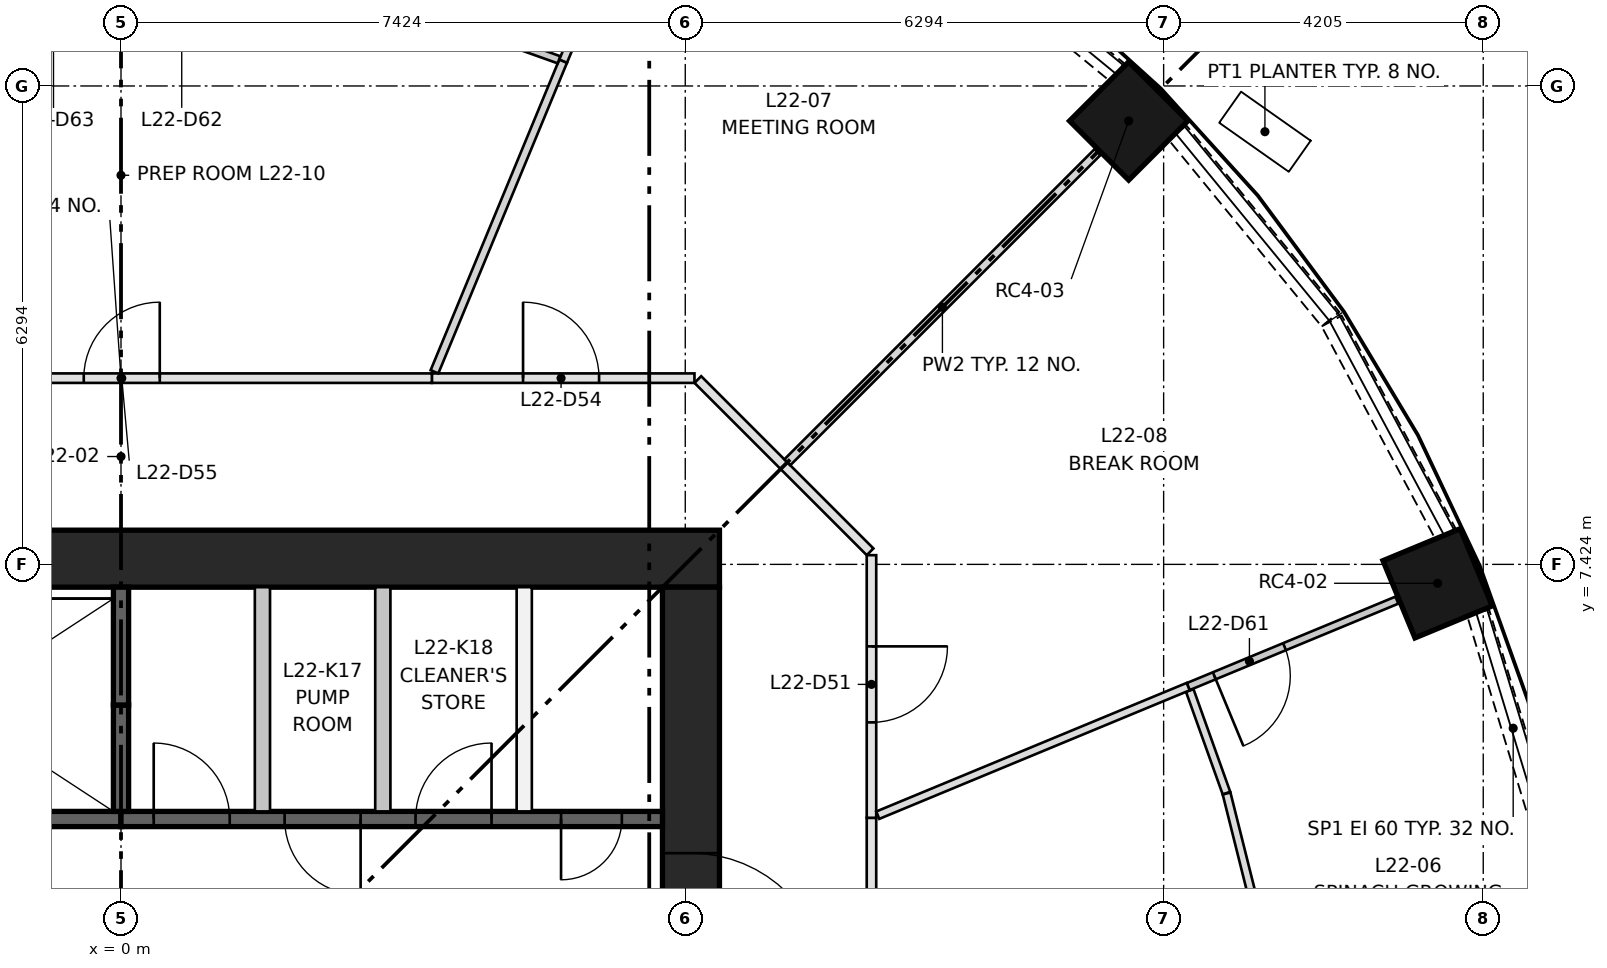
"""IFC4 building model, lengths in metres.
Left out: names, types, materials, properties, quantities, classifications, styles, units other than length and angle.
Written with IfcOpenShell. Run it as: python <this file> out.ifc"""

import sys

from ifc_helpers import new_model, si_unit, direction, frame, frame_2d, origin, origin_2d, place, context, subcontext, project, spatial, rectangle, extrude, element, fill, save


model = new_model("IFC4")
c1 = context("Model", 3, precision=1e-05, world=origin(), true_north=direction((0.0, 1.0)))
c2 = subcontext(c1, "Body", "Model", "MODEL_VIEW")
j1 = project(units=[si_unit("LENGTHUNIT", "METRE"), si_unit("PLANEANGLEUNIT", "RADIAN")], contexts=[c1])
p1 = place(None, origin())
s1 = spatial("IfcSite", under=j1, at=p1, CompositionType="ELEMENT")
p2 = place(p1, origin())
s2 = spatial("IfcBuilding", under=s1, at=p2, CompositionType="ELEMENT")
p3 = place(p2, frame((0.0, 0.0, 87.35)))
s3 = spatial("IfcBuildingStorey", under=s2, at=p3, CompositionType="ELEMENT", Elevation=87.35)
for number, where, z_axis, x_axis in (
    (1, (17.323, 7.175, 0.0), (0.0, 0.0, 1.0), (0.924, 0.383, 0.0)),
    (2, (13.258, 13.258, 0.0), (0.0, 0.0, 1.0), (0.707, 0.707, 0.0)),
):
    element("IfcColumn", number, at=place(p3, frame(where, z_axis=z_axis, x_axis=x_axis)), inside=s3, PredefinedType="COLUMN", context=c2, shape_type="SweptSolid", body=[
        extrude(rectangle(XDim=1.1, YDim=1.1, at=origin_2d()), origin(), (0.0, 0.0, 1.0), 3.65),
    ])
p4 = place(p3, frame((-7.874, 7.499, 0.0), z_axis=(0.0, 0.0, 1.0), x_axis=(1.0, 0.0, 0.0)))
e3 = element("IfcWall", 3, at=p4, inside=s3, PredefinedType="SHEAR", context=c2, shape_type="SweptSolid", body=[
    extrude(rectangle(XDim=15.748, YDim=0.75, at=frame_2d((7.874, 0.0))), origin(), (0.0, 0.0, 1.0), 3.65),
])
p5 = place(p3, frame((7.499, -7.124, 0.0), z_axis=(0.0, 0.0, 1.0), x_axis=(0.0, 1.0, 0.0)))
e4 = element("IfcWall", 4, at=p5, inside=s3, PredefinedType="SHEAR", context=c2, shape_type="SweptSolid", body=[
    extrude(rectangle(XDim=14.248, YDim=0.75, at=frame_2d((7.124, 0.0))), origin(), (0.0, 0.0, 1.0), 3.65),
])
p6 = place(p5, frame((6.624, 0.0, 0.0)))
e5 = element("IfcOpeningElement", 5, at=p6, cuts=e4, PredefinedType="OPENING", context=c2, shape_type="SweptSolid", body=[
    extrude(rectangle(XDim=1.0, YDim=2.1, at=frame_2d((0.5, 1.05))), frame((0.0, 0.385, 0.0), z_axis=(0.0, -1.0, 0.0), x_axis=(1.0, 0.0, 0.0)), (0.0, 0.0, 1.0), 0.77),
])
p7 = place(p5, frame((3.5, 0.0, 0.0)))
e6 = element("IfcOpeningElement", 6, at=p7, cuts=e4, PredefinedType="OPENING", context=c2, shape_type="SweptSolid", body=[
    extrude(rectangle(XDim=1.8, YDim=2.1, at=frame_2d((0.9, 1.05))), frame((0.0, 0.385, 0.0), z_axis=(0.0, -1.0, 0.0), x_axis=(1.0, 0.0, 0.0)), (0.0, 0.0, 1.0), 0.77),
])
p8 = place(p5, frame((8.948, 0.0, 0.0)))
e7 = element("IfcOpeningElement", 7, at=p8, cuts=e4, PredefinedType="OPENING", context=c2, shape_type="SweptSolid", body=[
    extrude(rectangle(XDim=1.8, YDim=2.1, at=frame_2d((0.9, 1.05))), frame((0.0, 0.385, 0.0), z_axis=(0.0, -1.0, 0.0), x_axis=(1.0, 0.0, 0.0)), (0.0, 0.0, 1.0), 0.77),
])
p9 = place(p3, frame((-7.124, 4.074, 0.0), z_axis=(0.0, 0.0, 1.0), x_axis=(1.0, 0.0, 0.0)))
e8 = element("IfcWall", 8, at=p9, inside=s3, PredefinedType="SHEAR", context=c2, shape_type="SweptSolid", body=[
    extrude(rectangle(XDim=7.124, YDim=0.2, at=frame_2d((3.562, 0.0))), origin(), (0.0, 0.0, 1.0), 3.3),
])
p10 = place(p3, frame((0.0, 4.074, 0.0), z_axis=(0.0, 0.0, 1.0), x_axis=(1.0, 0.0, 0.0)))
e9 = element("IfcWall", 9, at=p10, inside=s3, PredefinedType="SHEAR", context=c2, shape_type="SweptSolid", body=[
    extrude(rectangle(XDim=7.124, YDim=0.2, at=frame_2d((3.562, 0.0))), origin(), (0.0, 0.0, 1.0), 3.3),
])
p11 = place(p10, frame((0.43, 0.0, 0.0)))
e10 = element("IfcOpeningElement", 10, at=p11, cuts=e9, PredefinedType="OPENING", context=c2, shape_type="SweptSolid", body=[
    extrude(rectangle(XDim=1.0, YDim=2.1, at=frame_2d((0.5, 1.05))), frame((0.0, 0.11, 0.0), z_axis=(0.0, -1.0, 0.0), x_axis=(1.0, 0.0, 0.0)), (0.0, 0.0, 1.0), 0.22),
])
p12 = place(p10, frame((2.153, 0.0, 0.0)))
e11 = element("IfcOpeningElement", 11, at=p12, cuts=e9, PredefinedType="OPENING", context=c2, shape_type="SweptSolid", body=[
    extrude(rectangle(XDim=1.0, YDim=2.1, at=frame_2d((0.5, 1.05))), frame((0.0, 0.11, 0.0), z_axis=(0.0, -1.0, 0.0), x_axis=(1.0, 0.0, 0.0)), (0.0, 0.0, 1.0), 0.22),
])
p13 = place(p10, frame((3.875, 0.0, 0.0)))
e12 = element("IfcOpeningElement", 12, at=p13, cuts=e9, PredefinedType="OPENING", context=c2, shape_type="SweptSolid", body=[
    extrude(rectangle(XDim=1.0, YDim=2.1, at=frame_2d((0.5, 1.05))), frame((0.0, 0.11, 0.0), z_axis=(0.0, -1.0, 0.0), x_axis=(1.0, 0.0, 0.0)), (0.0, 0.0, 1.0), 0.22),
])
p14 = place(p10, frame((5.79, 0.0, 0.0)))
e13 = element("IfcOpeningElement", 13, at=p14, cuts=e9, PredefinedType="OPENING", context=c2, shape_type="SweptSolid", body=[
    extrude(rectangle(XDim=0.8, YDim=2.1, at=frame_2d((0.4, 1.05))), frame((0.0, 0.11, 0.0), z_axis=(0.0, -1.0, 0.0), x_axis=(1.0, 0.0, 0.0)), (0.0, 0.0, 1.0), 0.22),
])
p15 = place(p3, frame((0.0, 4.174, 0.0), z_axis=(0.0, 0.0, 1.0), x_axis=(0.0, 1.0, 0.0)))
e14 = element("IfcWall", 14, at=p15, inside=s3, PredefinedType="SHEAR", context=c2, shape_type="SweptSolid", body=[
    extrude(rectangle(XDim=1.4, YDim=0.2, at=frame_2d((0.7, 0.0))), origin(), (0.0, 0.0, 1.0), 3.3),
])
p16 = place(p3, frame((0.0, 5.574, 0.0), z_axis=(0.0, 0.0, 1.0), x_axis=(0.0, 1.0, 0.0)))
e15 = element("IfcWall", 15, at=p16, inside=s3, PredefinedType="SHEAR", context=c2, shape_type="SweptSolid", body=[
    extrude(rectangle(XDim=1.55, YDim=0.2, at=frame_2d((0.775, 0.0))), origin(), (0.0, 0.0, 1.0), 3.3),
])
for number, where, z_axis, x_axis in (
    (16, (1.861, 4.174, 0.0), (0.0, 0.0, 1.0), (0.0, 1.0, 0.0)),
    (17, (3.445, 4.174, 0.0), (0.0, 0.0, 1.0), (0.0, 1.0, 0.0)),
    (18, (5.305, 4.174, 0.0), (0.0, 0.0, 1.0), (0.0, 1.0, 0.0)),
):
    element("IfcWall", number, at=place(p3, frame(where, z_axis=z_axis, x_axis=x_axis)), inside=s3, PredefinedType="PARTITIONING", context=c2, shape_type="SweptSolid", body=[
        extrude(rectangle(XDim=2.95, YDim=0.2, at=frame_2d((1.475, 0.0))), origin(), (0.0, 0.0, 1.0), 3.3),
    ])
p17 = place(p3, frame((18.778, 3.75, 0.0), z_axis=(0.0, 0.0, 1.0), x_axis=(-0.290325591482, 0.956927923582, 0.0)))
e19 = element("IfcWall", 19, at=p17, inside=s3, PredefinedType="SOLIDWALL", context=c2, shape_type="SweptSolid", body=[
    extrude(rectangle(XDim=3.173, YDim=0.3, at=frame_2d((1.586, 0.0))), origin(), (0.0, 0.0, 1.0), 0.9),
])
p18 = place(p3, frame((17.425, 7.828, 0.0), z_axis=(0.0, 0.0, 1.0), x_axis=(-0.471458802606, 0.88188808669, 0.0)))
e20 = element("IfcWall", 20, at=p18, inside=s3, PredefinedType="SOLIDWALL", context=c2, shape_type="SweptSolid", body=[
    extrude(rectangle(XDim=3.172, YDim=0.3, at=frame_2d((1.586, 0.0))), origin(), (0.0, 0.0, 1.0), 0.9),
])
for number, where, z_axis, x_axis in (
    (21, (15.913, 10.651, 0.0), (0.0, 0.0, 1.0), (-0.634, 0.773, 0.0)),
    (22, (13.104, 13.9, 0.0), (0.0, 0.0, 1.0), (-0.773, 0.634, 0.0)),
):
    element("IfcWall", number, at=place(p3, frame(where, z_axis=z_axis, x_axis=x_axis)), inside=s3, PredefinedType="SOLIDWALL", context=c2, shape_type="SweptSolid", body=[
        extrude(rectangle(XDim=3.173, YDim=0.3, at=frame_2d((1.586, 0.0))), origin(), (0.0, 0.0, 1.0), 0.9),
    ])
p19 = place(p3, frame((9.874, 4.09, 0.0), z_axis=(0.0, 0.0, 1.0), x_axis=(0.0, -1.0, 0.0)))
e23 = element("IfcWall", 23, at=p19, inside=s3, PredefinedType="PARTITIONING", context=c2, shape_type="SweptSolid", body=[
    extrude(rectangle(XDim=4.09, YDim=0.125, at=frame_2d((2.045, 0.0))), origin(), (0.0, 0.0, 1.0), 3.3),
])
p20 = place(p19, frame((1.5, 0.0, 0.0)))
e24 = element("IfcOpeningElement", 24, at=p20, cuts=e23, PredefinedType="OPENING", context=c2, shape_type="SweptSolid", body=[
    extrude(rectangle(XDim=1.0, YDim=2.1, at=frame_2d((0.5, 1.05))), frame((0.0, 0.073, 0.0), z_axis=(0.0, -1.0, 0.0), x_axis=(1.0, 0.0, 0.0)), (0.0, 0.0, 1.0), 0.145),
])
p21 = place(p3, frame((8.722, 8.722, 0.0), z_axis=(0.0, 0.0, 1.0), x_axis=(0.70718294931, -0.707030604857, 0.0)))
e25 = element("IfcWall", 25, at=p21, inside=s3, PredefinedType="PARTITIONING", context=c2, shape_type="SweptSolid", body=[
    extrude(rectangle(XDim=1.603, YDim=0.125, at=frame_2d((0.801, 0.0))), origin(), (0.0, 0.0, 1.0), 3.3),
])
p22 = place(p3, frame((9.874, 7.545, 0.0), z_axis=(0.0, 0.0, 1.0), x_axis=(0.0, -1.0, 0.0)))
e26 = element("IfcWall", 26, at=p22, inside=s3, PredefinedType="PARTITIONING", context=c2, shape_type="SweptSolid", body=[
    extrude(rectangle(XDim=3.455, YDim=0.125, at=frame_2d((1.728, 0.0))), origin(), (0.0, 0.0, 1.0), 3.3),
])
p23 = place(p22, frame((1.2, 0.0, 0.0)))
e27 = element("IfcOpeningElement", 27, at=p23, cuts=e26, PredefinedType="OPENING", context=c2, shape_type="SweptSolid", body=[
    extrude(rectangle(XDim=1.0, YDim=2.1, at=frame_2d((0.5, 1.05))), frame((0.0, 0.073, 0.0), z_axis=(0.0, -1.0, 0.0), x_axis=(1.0, 0.0, 0.0)), (0.0, 0.0, 1.0), 0.145),
])
p24 = place(p3, frame((4.09, 9.874, 0.0), z_axis=(0.0, 0.0, 1.0), x_axis=(1.0, 0.0, 0.0)))
e28 = element("IfcWall", 28, at=p24, inside=s3, PredefinedType="PARTITIONING", context=c2, shape_type="SweptSolid", body=[
    extrude(rectangle(XDim=3.455, YDim=0.125, at=frame_2d((1.728, 0.0))), origin(), (0.0, 0.0, 1.0), 3.3),
])
p25 = place(p24, frame((1.2, 0.0, 0.0)))
e29 = element("IfcOpeningElement", 29, at=p25, cuts=e28, PredefinedType="OPENING", context=c2, shape_type="SweptSolid", body=[
    extrude(rectangle(XDim=1.0, YDim=2.1, at=frame_2d((0.5, 1.05))), frame((0.0, 0.073, 0.0), z_axis=(0.0, -1.0, 0.0), x_axis=(1.0, 0.0, 0.0)), (0.0, 0.0, 1.0), 0.145),
])
p26 = place(p3, frame((7.589, 9.856, 0.0), z_axis=(0.0, 0.0, 1.0), x_axis=(0.707030604857, -0.70718294931, 0.0)))
e30 = element("IfcWall", 30, at=p26, inside=s3, PredefinedType="PARTITIONING", context=c2, shape_type="SweptSolid", body=[
    extrude(rectangle(XDim=1.603, YDim=0.125, at=frame_2d((0.801, 0.0))), origin(), (0.0, 0.0, 1.0), 3.3),
])
p27 = place(p3, frame((-4.09, 9.874, 0.0), z_axis=(0.0, 0.0, 1.0), x_axis=(1.0, 0.0, 0.0)))
e31 = element("IfcWall", 31, at=p27, inside=s3, PredefinedType="PARTITIONING", context=c2, shape_type="SweptSolid", body=[
    extrude(rectangle(XDim=8.18, YDim=0.125, at=frame_2d((4.09, 0.0))), origin(), (0.0, 0.0, 1.0), 3.3),
])
p28 = place(p27, frame((3.6, 0.0, 0.0)))
e32 = element("IfcOpeningElement", 32, at=p28, cuts=e31, PredefinedType="OPENING", context=c2, shape_type="SweptSolid", body=[
    extrude(rectangle(XDim=1.0, YDim=2.1, at=frame_2d((0.5, 1.05))), frame((0.0, 0.073, 0.0), z_axis=(0.0, -1.0, 0.0), x_axis=(1.0, 0.0, 0.0)), (0.0, 0.0, 1.0), 0.145),
])
p29 = place(p3, frame((14.062, 5.765, 0.0), z_axis=(0.0, 0.0, 1.0), x_axis=(0.336940319535, -0.941526006583, 0.0)))
e33 = element("IfcWall", 33, at=p29, inside=s3, PredefinedType="PARTITIONING", context=c2, shape_type="SweptSolid", body=[
    extrude(rectangle(XDim=1.434, YDim=0.105, at=frame_2d((0.717, 0.0))), origin(), (0.0, 0.0, 1.0), 3.3),
])
p30 = place(p3, frame((14.546, 4.41, 0.0), z_axis=(0.0, 0.0, 1.0), x_axis=(0.242922070527, -0.970045806986, 0.0)))
e34 = element("IfcWall", 34, at=p30, inside=s3, PredefinedType="PARTITIONING", context=c2, shape_type="SweptSolid", body=[
    extrude(rectangle(XDim=1.486, YDim=0.105, at=frame_2d((0.743, 0.0))), origin(), (0.0, 0.0, 1.0), 3.3),
])
p31 = place(p3, frame((9.957, 4.124, 0.0), z_axis=(0.0, 0.0, 1.0), x_axis=(0.923862097388, 0.382725521764, 0.0)))
e35 = element("IfcWall", 35, at=p31, inside=s3, PredefinedType="PARTITIONING", context=c2, shape_type="SweptSolid", body=[
    extrude(rectangle(XDim=4.423, YDim=0.105, at=frame_2d((2.211, 0.0))), origin(), (0.0, 0.0, 1.0), 3.3),
])
p32 = place(p3, frame((16.787, 6.953, 0.0), z_axis=(0.0, 0.0, 1.0), x_axis=(-0.923889594764, -0.382659139036, 0.0)))
e36 = element("IfcWall", 36, at=p32, inside=s3, PredefinedType="PARTITIONING", context=c2, shape_type="SweptSolid", body=[
    extrude(rectangle(XDim=2.97, YDim=0.1, at=frame_2d((1.485, 0.0))), origin(), (0.0, 0.0, 1.0), 3.3),
])
p33 = place(p32, frame((1.6, 0.0, 0.0)))
e37 = element("IfcOpeningElement", 37, at=p33, cuts=e36, PredefinedType="OPENING", context=c2, shape_type="SweptSolid", body=[
    extrude(rectangle(XDim=1.0, YDim=2.1, at=frame_2d((0.5, 1.05))), frame((0.0, 0.06, 0.0), z_axis=(0.0, -1.0, 0.0), x_axis=(1.0, 0.0, 0.0)), (0.0, 0.0, 1.0), 0.12),
])
p34 = place(p3, frame((12.848, 12.848, 0.0), z_axis=(0.0, 0.0, 1.0), x_axis=(-0.707106781187, -0.707106781187, 0.0)))
e38 = element("IfcWall", 38, at=p34, inside=s3, PredefinedType="PARTITIONING", context=c2, shape_type="SweptSolid", body=[
    extrude(rectangle(XDim=5.772, YDim=0.11, at=frame_2d((2.886, 0.0))), origin(), (0.0, 0.0, 1.0), 3.3),
])
p35 = place(p3, frame((5.817, 14.043, 0.0), z_axis=(0.0, 0.0, 1.0), x_axis=(0.382659139036, 0.923889594764, 0.0)))
e39 = element("IfcWall", 39, at=p35, inside=s3, PredefinedType="PARTITIONING", context=c2, shape_type="SweptSolid", body=[
    extrude(rectangle(XDim=2.97, YDim=0.11, at=frame_2d((1.485, 0.0))), origin(), (0.0, 0.0, 1.0), 3.3),
])
p36 = place(p3, frame((4.125, 9.958, 0.0), z_axis=(0.0, 0.0, 1.0), x_axis=(0.382709362011, 0.923868791674, 0.0)))
e40 = element("IfcWall", 40, at=p36, inside=s3, PredefinedType="PARTITIONING", context=c2, shape_type="SweptSolid", body=[
    extrude(rectangle(XDim=4.422, YDim=0.11, at=frame_2d((2.211, 0.0))), origin(), (0.0, 0.0, 1.0), 3.3),
])
p37 = place(p3, frame((5.763, 14.062, 0.0), z_axis=(0.0, 0.0, 1.0), x_axis=(-0.941587499657, 0.33676843749, 0.0)))
e41 = element("IfcWall", 41, at=p37, inside=s3, PredefinedType="PARTITIONING", context=c2, shape_type="SweptSolid", body=[
    extrude(rectangle(XDim=1.432, YDim=0.1, at=frame_2d((0.716, 0.0))), origin(), (0.0, 0.0, 1.0), 3.3),
])
p38 = place(p11, origin())
e42 = element("IfcDoor", 42, at=p38, inside=s3, OperationType="SINGLE_SWING_LEFT", PredefinedType="DOOR", context=c2, shape_type="SweptSolid", body=[
    extrude(rectangle(XDim=1.0, YDim=2.1, at=frame_2d((0.5, 1.05))), frame((0.0, 0.025, 0.0), z_axis=(0.0, -1.0, 0.0), x_axis=(1.0, 0.0, 0.0)), (0.0, 0.0, 1.0), 0.05),
])
fill(e10, e42)
p39 = place(p12, frame((1.0, 0.0, 0.0), z_axis=(0.0, 0.0, 1.0), x_axis=(-1.0, 0.0, 0.0)))
e43 = element("IfcDoor", 43, at=p39, inside=s3, OperationType="SINGLE_SWING_RIGHT", PredefinedType="DOOR", context=c2, shape_type="SweptSolid", body=[
    extrude(rectangle(XDim=1.0, YDim=2.1, at=frame_2d((0.5, 1.05))), frame((0.0, 0.025, 0.0), z_axis=(0.0, -1.0, 0.0), x_axis=(1.0, 0.0, 0.0)), (0.0, 0.0, 1.0), 0.05),
])
fill(e11, e43)
p40 = place(p13, origin())
e44 = element("IfcDoor", 44, at=p40, inside=s3, OperationType="SINGLE_SWING_RIGHT", PredefinedType="DOOR", context=c2, shape_type="SweptSolid", body=[
    extrude(rectangle(XDim=1.0, YDim=2.1, at=frame_2d((0.5, 1.05))), frame((0.0, 0.025, 0.0), z_axis=(0.0, -1.0, 0.0), x_axis=(1.0, 0.0, 0.0)), (0.0, 0.0, 1.0), 0.05),
])
fill(e12, e44)
p41 = place(p14, frame((0.8, 0.0, 0.0), z_axis=(0.0, 0.0, 1.0), x_axis=(-1.0, 0.0, 0.0)))
e45 = element("IfcDoor", 45, at=p41, inside=s3, OperationType="SINGLE_SWING_LEFT", PredefinedType="DOOR", context=c2, shape_type="SweptSolid", body=[
    extrude(rectangle(XDim=0.8, YDim=2.1, at=frame_2d((0.4, 1.05))), frame((0.0, 0.025, 0.0), z_axis=(0.0, -1.0, 0.0), x_axis=(1.0, 0.0, 0.0)), (0.0, 0.0, 1.0), 0.05),
])
fill(e13, e45)
p42 = place(p8, frame((1.8, 0.0, 0.0), z_axis=(0.0, 0.0, 1.0), x_axis=(-1.0, 0.0, 0.0)))
e46 = element("IfcDoor", 46, at=p42, inside=s3, OperationType="DOUBLE_DOOR_SINGLE_SWING", PredefinedType="DOOR", context=c2, shape_type="SweptSolid", body=[
    extrude(rectangle(XDim=1.8, YDim=2.1, at=frame_2d((0.9, 1.05))), frame((0.0, 0.025, 0.0), z_axis=(0.0, -1.0, 0.0), x_axis=(1.0, 0.0, 0.0)), (0.0, 0.0, 1.0), 0.05),
])
fill(e7, e46)
p43 = place(p23, origin())
e47 = element("IfcDoor", 47, at=p43, inside=s3, OperationType="SINGLE_SWING_LEFT", PredefinedType="DOOR", context=c2, shape_type="SweptSolid", body=[
    extrude(rectangle(XDim=1.0, YDim=2.1, at=frame_2d((0.5, 1.05))), frame((0.0, 0.025, 0.0), z_axis=(0.0, -1.0, 0.0), x_axis=(1.0, 0.0, 0.0)), (0.0, 0.0, 1.0), 0.05),
])
fill(e27, e47)
p44 = place(p25, origin())
e48 = element("IfcDoor", 48, at=p44, inside=s3, OperationType="SINGLE_SWING_LEFT", PredefinedType="DOOR", context=c2, shape_type="SweptSolid", body=[
    extrude(rectangle(XDim=1.0, YDim=2.1, at=frame_2d((0.5, 1.05))), frame((0.0, 0.025, 0.0), z_axis=(0.0, -1.0, 0.0), x_axis=(1.0, 0.0, 0.0)), (0.0, 0.0, 1.0), 0.05),
])
fill(e29, e48)
p45 = place(p28, origin())
e49 = element("IfcDoor", 49, at=p45, inside=s3, OperationType="SINGLE_SWING_RIGHT", PredefinedType="DOOR", context=c2, shape_type="SweptSolid", body=[
    extrude(rectangle(XDim=1.0, YDim=2.1, at=frame_2d((0.5, 1.05))), frame((0.0, 0.025, 0.0), z_axis=(0.0, -1.0, 0.0), x_axis=(1.0, 0.0, 0.0)), (0.0, 0.0, 1.0), 0.05),
])
fill(e32, e49)
p46 = place(p33, origin())
e50 = element("IfcDoor", 50, at=p46, inside=s3, OperationType="SINGLE_SWING_RIGHT", PredefinedType="DOOR", context=c2, shape_type="SweptSolid", body=[
    extrude(rectangle(XDim=1.0, YDim=2.1, at=frame_2d((0.5, 1.05))), frame((0.0, 0.025, 0.0), z_axis=(0.0, -1.0, 0.0), x_axis=(1.0, 0.0, 0.0)), (0.0, 0.0, 1.0), 0.05),
])
fill(e37, e50)
save(model, sys.argv[1])
